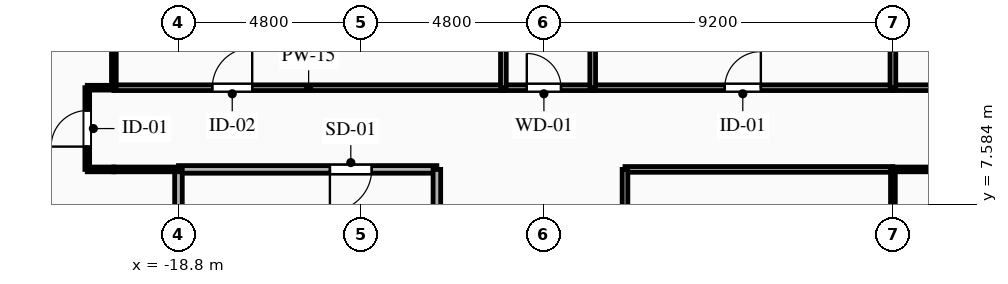
"""IFC4 building model, lengths in metres.
Left out: names, types, materials, properties, quantities, classifications, styles, units other than length and angle.
Written with IfcOpenShell. Run it as: python <this file> out.ifc"""

import sys

from ifc_helpers import new_model, si_unit, direction, frame, frame_2d, origin, place, context, subcontext, project, spatial, rectangle, extrude, element, fill, save


model = new_model("IFC4")
c1 = context("Model", 3, precision=1e-05, world=origin(), true_north=direction((0.0, 1.0)))
c2 = subcontext(c1, "Body", "Model", "MODEL_VIEW")
j1 = project(units=[si_unit("LENGTHUNIT", "METRE"), si_unit("PLANEANGLEUNIT", "RADIAN")], contexts=[c1])
p1 = place(None, origin())
s1 = spatial("IfcSite", under=j1, at=p1, CompositionType="ELEMENT")
p2 = place(p1, origin())
s2 = spatial("IfcBuilding", under=s1, at=p2, CompositionType="ELEMENT")
p3 = place(p2, frame((0.0, 0.0, 238.35)))
s3 = spatial("IfcBuildingStorey", under=s2, at=p3, CompositionType="ELEMENT", Elevation=238.35)
p4 = place(p3, frame((-12.0, 8.5, 0.0), z_axis=(0.0, 0.0, 1.0), x_axis=(-1.0, 0.0, 0.0)))
e1 = element("IfcWall", 1, at=p4, inside=s3, PredefinedType="PARTITIONING", context=c2, shape_type="SweptSolid", body=[
    extrude(rectangle(XDim=6.8, YDim=0.2, at=frame_2d((3.4, 0.0))), origin(), (0.0, 0.0, 1.0), 3.04),
])
p5 = place(p4, frame((1.715, 0.0, 0.0)))
e2 = element("IfcOpeningElement", 2, at=p5, cuts=e1, PredefinedType="OPENING", context=c2, shape_type="SweptSolid", body=[
    extrude(rectangle(XDim=1.1, YDim=2.15, at=frame_2d((0.55, 1.075))), frame((0.0, 0.11, 0.0), z_axis=(0.0, -1.0, 0.0), x_axis=(1.0, 0.0, 0.0)), (0.0, 0.0, 1.0), 0.22),
])
p6 = place(p3, frame((-12.0, 5.6, 0.0), z_axis=(0.0, 0.0, 1.0), x_axis=(0.0, 1.0, 0.0)))
e3 = element("IfcWall", 3, at=p6, inside=s3, PredefinedType="PARTITIONING", context=c2, shape_type="SweptSolid", body=[
    extrude(rectangle(XDim=2.9, YDim=0.2, at=frame_2d((1.45, 0.0))), origin(), (0.0, 0.0, 1.0), 3.04),
])
p7 = place(p3, frame((-18.8, 8.5, 0.0), z_axis=(0.0, 0.0, 1.0), x_axis=(0.0, -1.0, 0.0)))
e4 = element("IfcWall", 4, at=p7, inside=s3, PredefinedType="PARTITIONING", context=c2, shape_type="SweptSolid", body=[
    extrude(rectangle(XDim=2.9, YDim=0.2, at=frame_2d((1.45, 0.0))), origin(), (0.0, 0.0, 1.0), 2.665),
])
p8 = place(p3, frame((-21.2, 8.5, 0.0), z_axis=(0.0, 0.0, 1.0), x_axis=(0.0, 1.0, 0.0)))
e5 = element("IfcWall", 5, at=p8, inside=s3, PredefinedType="PARTITIONING", context=c2, shape_type="SweptSolid", body=[
    extrude(rectangle(XDim=2.15, YDim=0.125, at=frame_2d((1.075, 0.0))), origin(), (0.0, 0.0, 1.0), 2.695),
])
p9 = place(p8, frame((0.6, 0.0, 0.0)))
e6 = element("IfcOpeningElement", 6, at=p9, cuts=e5, PredefinedType="OPENING", context=c2, shape_type="SweptSolid", body=[
    extrude(rectangle(XDim=0.95, YDim=2.1, at=frame_2d((0.475, 1.05))), frame((0.0, 0.073, 0.0), z_axis=(0.0, -1.0, 0.0), x_axis=(1.0, 0.0, 0.0)), (0.0, 0.0, 1.0), 0.145),
])
p10 = place(p3, frame((-18.8, 8.5, 0.0), z_axis=(0.0, 0.0, 1.0), x_axis=(-1.0, 0.0, 0.0)))
e7 = element("IfcWall", 7, at=p10, inside=s3, PredefinedType="PARTITIONING", context=c2, shape_type="SweptSolid", body=[
    extrude(rectangle(XDim=1.7, YDim=0.125, at=frame_2d((0.85, 0.0))), origin(), (0.0, 0.0, 1.0), 3.04),
])
for number, where, z_axis, x_axis in (
    (8, (-20.5, 8.5, 0.0), (0.0, 0.0, 1.0), (-1.0, 0.0, 0.0)),
    (9, (-21.2, 10.65, 0.0), (0.0, 0.0, 1.0), (1.0, 0.0, 0.0)),
):
    element("IfcWall", number, at=place(p3, frame(where, z_axis=z_axis, x_axis=x_axis)), inside=s3, PredefinedType="PARTITIONING", context=c2, shape_type="SweptSolid", body=[
        extrude(rectangle(XDim=0.7, YDim=0.125, at=frame_2d((0.35, 0.0))), origin(), (0.0, 0.0, 1.0), 3.04),
    ])
p11 = place(p3, frame((-20.5, 10.65, 0.0), z_axis=(0.0, 0.0, 1.0), x_axis=(1.0, 0.0, 0.0)))
e10 = element("IfcWall", 10, at=p11, inside=s3, PredefinedType="PARTITIONING", context=c2, shape_type="SweptSolid", body=[
    extrude(rectangle(XDim=10.25, YDim=0.15, at=frame_2d((5.125, 0.0))), origin(), (0.0, 0.0, 1.0), 3.04),
])
p12 = place(p11, frame((2.59, 0.0, 0.0)))
e11 = element("IfcOpeningElement", 11, at=p12, cuts=e10, PredefinedType="OPENING", context=c2, shape_type="SweptSolid", body=[
    extrude(rectangle(XDim=1.05, YDim=2.15, at=frame_2d((0.525, 1.075))), frame((0.0, 0.085, 0.0), z_axis=(0.0, -1.0, 0.0), x_axis=(1.0, 0.0, 0.0)), (0.0, 0.0, 1.0), 0.17),
])
p13 = place(p3, frame((-10.25, 10.65, 0.0), z_axis=(0.0, 0.0, 1.0), x_axis=(1.0, 0.0, 0.0)))
e12 = element("IfcWall", 12, at=p13, inside=s3, PredefinedType="PLUMBINGWALL", context=c2, shape_type="SweptSolid", body=[
    extrude(rectangle(XDim=2.35, YDim=0.15, at=frame_2d((1.175, 0.0))), origin(), (0.0, 0.0, 1.0), 3.04),
])
p14 = place(p13, frame((0.616, 0.0, 0.0)))
e13 = element("IfcOpeningElement", 13, at=p14, cuts=e12, PredefinedType="OPENING", context=c2, shape_type="SweptSolid", body=[
    extrude(rectangle(XDim=0.9, YDim=2.1, at=frame_2d((0.45, 1.05))), frame((0.0, 0.085, 0.0), z_axis=(0.0, -1.0, 0.0), x_axis=(1.0, 0.0, 0.0)), (0.0, 0.0, 1.0), 0.17),
])
p15 = place(p3, frame((-7.9, 10.65, 0.0), z_axis=(0.0, 0.0, 1.0), x_axis=(1.0, 0.0, 0.0)))
e14 = element("IfcWall", 14, at=p15, inside=s3, PredefinedType="PARTITIONING", context=c2, shape_type="SweptSolid", body=[
    extrude(rectangle(XDim=7.9, YDim=0.15, at=frame_2d((3.95, 0.0))), origin(), (0.0, 0.0, 1.0), 3.04),
])
p16 = place(p15, frame((3.475, 0.0, 0.0)))
e15 = element("IfcOpeningElement", 15, at=p16, cuts=e14, PredefinedType="OPENING", context=c2, shape_type="SweptSolid", body=[
    extrude(rectangle(XDim=0.95, YDim=2.1, at=frame_2d((0.475, 1.05))), frame((0.0, 0.085, 0.0), z_axis=(0.0, -1.0, 0.0), x_axis=(1.0, 0.0, 0.0)), (0.0, 0.0, 1.0), 0.17),
])
p17 = place(p3, frame((0.0, 8.5, 0.0), z_axis=(0.0, 0.0, 1.0), x_axis=(-1.0, 0.0, 0.0)))
e16 = element("IfcWall", 16, at=p17, inside=s3, PredefinedType="PARTITIONING", context=c2, shape_type="SweptSolid", body=[
    extrude(rectangle(XDim=7.05, YDim=0.15, at=frame_2d((3.525, 0.0))), origin(), (0.0, 0.0, 1.0), 3.04),
])
p18 = place(p3, frame((0.0, 10.65, 0.0), z_axis=(0.0, 0.0, 1.0), x_axis=(1.0, 0.0, 0.0)))
e17 = element("IfcWall", 17, at=p18, inside=s3, PredefinedType="PARTITIONING", context=c2, shape_type="SweptSolid", body=[
    extrude(rectangle(XDim=10.25, YDim=0.15, at=frame_2d((5.125, 0.0))), origin(), (0.0, 0.0, 1.0), 3.04),
])
p19 = place(p18, frame((2.59, 0.0, 0.0)))
e18 = element("IfcOpeningElement", 18, at=p19, cuts=e17, PredefinedType="OPENING", context=c2, shape_type="SweptSolid", body=[
    extrude(rectangle(XDim=1.05, YDim=2.15, at=frame_2d((0.525, 1.075))), frame((0.0, 0.085, 0.0), z_axis=(0.0, -1.0, 0.0), x_axis=(1.0, 0.0, 0.0)), (0.0, 0.0, 1.0), 0.17),
])
p20 = place(p3, frame((7.05, 8.5, 0.0), z_axis=(0.0, 0.0, 1.0), x_axis=(-1.0, 0.0, 0.0)))
e19 = element("IfcWall", 19, at=p20, inside=s3, PredefinedType="PARTITIONING", context=c2, shape_type="SweptSolid", body=[
    extrude(rectangle(XDim=7.05, YDim=0.125, at=frame_2d((3.525, 0.0))), origin(), (0.0, 0.0, 1.0), 3.04),
])
p21 = place(p3, frame((-7.05, 8.5, 0.0), z_axis=(0.0, 0.0, 1.0), x_axis=(0.0, -1.0, 0.0)))
e20 = element("IfcWall", 20, at=p21, inside=s3, PredefinedType="PARTITIONING", context=c2, shape_type="SweptSolid", body=[
    extrude(rectangle(XDim=14.1, YDim=0.15, at=frame_2d((7.05, 0.0))), origin(), (0.0, 0.0, 1.0), 3.04),
])
p22 = place(p21, frame((8.074, 0.0, 0.0)))
e21 = element("IfcOpeningElement", 21, at=p22, cuts=e20, PredefinedType="OPENING", context=c2, shape_type="SweptSolid", body=[
    extrude(rectangle(XDim=0.95, YDim=2.1, at=frame_2d((0.475, 1.05))), frame((0.0, 0.085, 0.0), z_axis=(0.0, -1.0, 0.0), x_axis=(1.0, 0.0, 0.0)), (0.0, 0.0, 1.0), 0.17),
])
p23 = place(p3, frame((-20.5, 15.2, 0.0), z_axis=(0.0, 0.0, 1.0), x_axis=(0.0, -1.0, 0.0)))
e22 = element("IfcWall", 22, at=p23, inside=s3, PredefinedType="PARTITIONING", context=c2, shape_type="SweptSolid", body=[
    extrude(rectangle(XDim=4.55, YDim=0.125, at=frame_2d((2.275, 0.0))), origin(), (0.0, 0.0, 1.0), 2.665),
])
p24 = place(p3, frame((-10.25, 15.2, 0.0), z_axis=(0.0, 0.0, 1.0), x_axis=(0.0, -1.0, 0.0)))
e23 = element("IfcWall", 23, at=p24, inside=s3, PredefinedType="PLUMBINGWALL", context=c2, shape_type="SweptSolid", body=[
    extrude(rectangle(XDim=4.55, YDim=0.15, at=frame_2d((2.275, 0.0))), origin(), (0.0, 0.0, 1.0), 3.04),
])
p25 = place(p3, frame((-7.9, 15.2, 0.0), z_axis=(0.0, 0.0, 1.0), x_axis=(0.0, -1.0, 0.0)))
e24 = element("IfcWall", 24, at=p25, inside=s3, PredefinedType="PLUMBINGWALL", context=c2, shape_type="SweptSolid", body=[
    extrude(rectangle(XDim=4.55, YDim=0.15, at=frame_2d((2.275, 0.0))), origin(), (0.0, 0.0, 1.0), 2.665),
])
p26 = place(p3, frame((0.0, 15.2, 0.0), z_axis=(0.0, 0.0, 1.0), x_axis=(0.0, -1.0, 0.0)))
e25 = element("IfcWall", 25, at=p26, inside=s3, PredefinedType="PARTITIONING", context=c2, shape_type="SweptSolid", body=[
    extrude(rectangle(XDim=4.55, YDim=0.15, at=frame_2d((2.275, 0.0))), origin(), (0.0, 0.0, 1.0), 3.04),
])
p27 = place(p3, frame((0.0, 8.5, 0.0), z_axis=(0.0, 0.0, 1.0), x_axis=(0.0, -1.0, 0.0)))
e26 = element("IfcWall", 26, at=p27, inside=s3, PredefinedType="PARTITIONING", context=c2, shape_type="SweptSolid", body=[
    extrude(rectangle(XDim=14.1, YDim=0.125, at=frame_2d((7.05, 0.0))), origin(), (0.0, 0.0, 1.0), 3.04),
])
p28 = place(p5, origin())
e27 = element("IfcDoor", 27, at=p28, inside=s3, OperationType="SINGLE_SWING_RIGHT", PredefinedType="DOOR", context=c2, shape_type="SweptSolid", body=[
    extrude(rectangle(XDim=1.1, YDim=2.15, at=frame_2d((0.55, 1.075))), frame((0.0, 0.025, 0.0), z_axis=(0.0, -1.0, 0.0), x_axis=(1.0, 0.0, 0.0)), (0.0, 0.0, 1.0), 0.05),
])
fill(e2, e27)
p29 = place(p9, origin())
e28 = element("IfcDoor", 28, at=p29, inside=s3, OperationType="SINGLE_SWING_LEFT", PredefinedType="DOOR", context=c2, shape_type="SweptSolid", body=[
    extrude(rectangle(XDim=0.95, YDim=2.1, at=frame_2d((0.475, 1.05))), frame((0.0, 0.025, 0.0), z_axis=(0.0, -1.0, 0.0), x_axis=(1.0, 0.0, 0.0)), (0.0, 0.0, 1.0), 0.05),
])
fill(e6, e28)
p30 = place(p12, origin())
e29 = element("IfcDoor", 29, at=p30, inside=s3, OperationType="SINGLE_SWING_RIGHT", PredefinedType="DOOR", context=c2, shape_type="SweptSolid", body=[
    extrude(rectangle(XDim=1.05, YDim=2.15, at=frame_2d((0.525, 1.075))), frame((0.0, 0.025, 0.0), z_axis=(0.0, -1.0, 0.0), x_axis=(1.0, 0.0, 0.0)), (0.0, 0.0, 1.0), 0.05),
])
fill(e11, e29)
p31 = place(p14, origin())
e30 = element("IfcDoor", 30, at=p31, inside=s3, OperationType="SINGLE_SWING_LEFT", PredefinedType="DOOR", context=c2, shape_type="SweptSolid", body=[
    extrude(rectangle(XDim=0.9, YDim=2.1, at=frame_2d((0.45, 1.05))), frame((0.0, 0.025, 0.0), z_axis=(0.0, -1.0, 0.0), x_axis=(1.0, 0.0, 0.0)), (0.0, 0.0, 1.0), 0.05),
])
fill(e13, e30)
p32 = place(p16, origin())
e31 = element("IfcDoor", 31, at=p32, inside=s3, OperationType="SINGLE_SWING_RIGHT", PredefinedType="DOOR", context=c2, shape_type="SweptSolid", body=[
    extrude(rectangle(XDim=0.95, YDim=2.1, at=frame_2d((0.475, 1.05))), frame((0.0, 0.025, 0.0), z_axis=(0.0, -1.0, 0.0), x_axis=(1.0, 0.0, 0.0)), (0.0, 0.0, 1.0), 0.05),
])
fill(e15, e31)
save(model, sys.argv[1])
